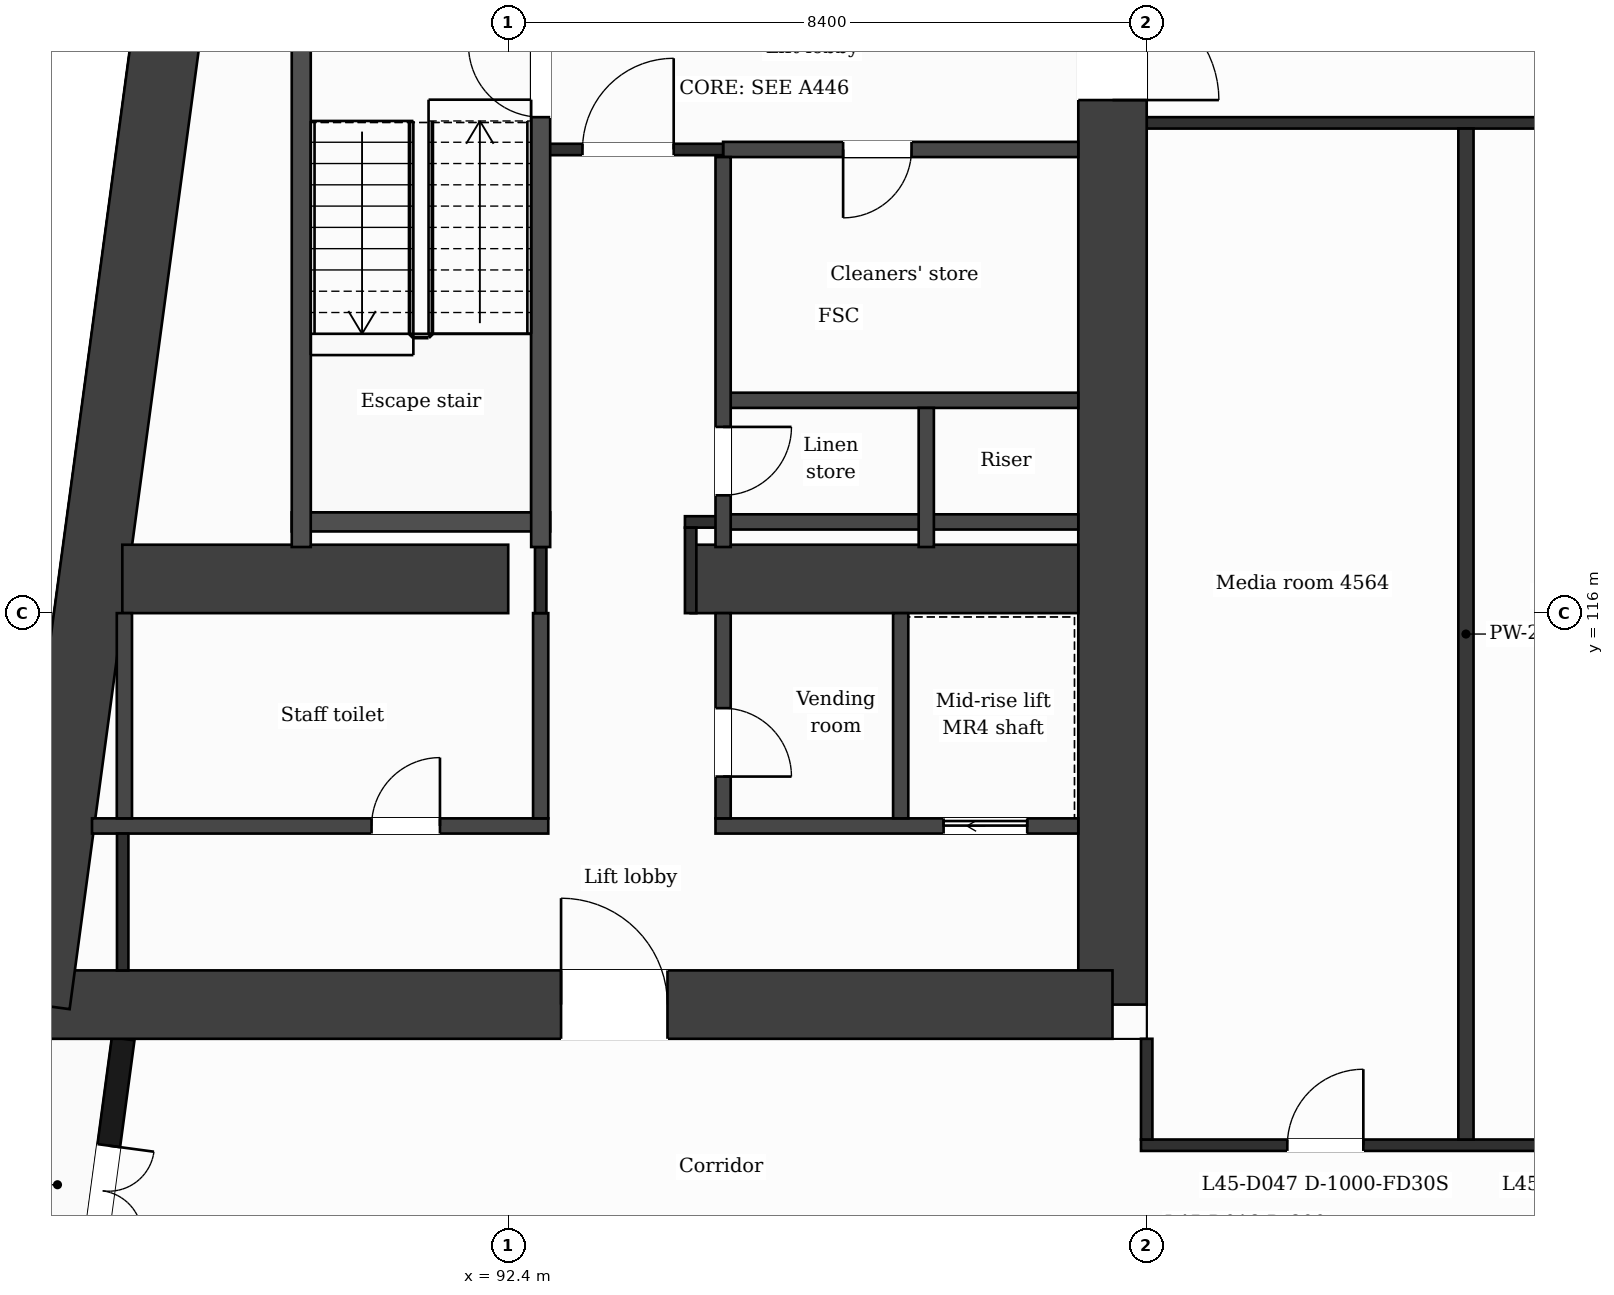
"""IFC4 building model, lengths in metres.
Left out: names, types, materials, properties, quantities, classifications, styles, units other than length and angle.
Written with IfcOpenShell. Run it as: python <this file> out.ifc"""

import sys

from ifc_helpers import new_model, si_unit, direction, frame, frame_2d, origin, place, context, subcontext, project, spatial, rectangle, extrude, element, fill, save


model = new_model("IFC4")
c1 = context("Model", 3, precision=1e-05, world=origin(), true_north=direction((0.0, 1.0)))
c2 = subcontext(c1, "Body", "Model", "MODEL_VIEW")
j1 = project(units=[si_unit("LENGTHUNIT", "METRE"), si_unit("PLANEANGLEUNIT", "RADIAN")], contexts=[c1])
p1 = place(None, origin())
s1 = spatial("IfcSite", under=j1, at=p1, CompositionType="ELEMENT")
p2 = place(p1, origin())
s2 = spatial("IfcBuilding", under=s1, at=p2, CompositionType="ELEMENT")
p3 = place(p2, frame((0.0, 0.0, 188.5)))
s3 = spatial("IfcBuildingStorey", under=s2, at=p3, CompositionType="ELEMENT", Elevation=188.5)
p4 = place(p3, frame((100.35, 131.95, 0.0), z_axis=(0.0, 0.0, 1.0), x_axis=(0.0, -1.0, 0.0)))
e1 = element("IfcWall", 1, at=p4, inside=s3, PredefinedType="SHEAR", context=c2, shape_type="SweptSolid", body=[
    extrude(rectangle(XDim=21.1, YDim=0.9, at=frame_2d((10.55, 0.0))), origin(), (0.0, 0.0, 1.0), 3.7),
])
p5 = place(p4, frame((7.8, 0.0, 0.0)))
e2 = element("IfcOpeningElement", 2, at=p5, cuts=e1, PredefinedType="OPENING", context=c2, shape_type="SweptSolid", body=[
    extrude(rectangle(XDim=1.4, YDim=2.1, at=frame_2d((0.7, 1.05))), frame((0.0, 0.46, 0.0), z_axis=(0.0, -1.0, 0.0), x_axis=(1.0, 0.0, 0.0)), (0.0, 0.0, 1.0), 0.92),
])
p6 = place(p3, frame((100.35, 110.85, 0.0), z_axis=(0.0, 0.0, 1.0), x_axis=(-1.0, 0.0, 0.0)))
e3 = element("IfcWall", 3, at=p6, inside=s3, PredefinedType="SHEAR", context=c2, shape_type="SweptSolid", body=[
    extrude(rectangle(XDim=14.166, YDim=0.9, at=frame_2d((7.083, 0.0))), origin(), (0.0, 0.0, 1.0), 3.7),
])
p7 = place(p6, frame((5.855, 0.0, 0.0)))
e4 = element("IfcOpeningElement", 4, at=p7, cuts=e3, PredefinedType="OPENING", context=c2, shape_type="SweptSolid", body=[
    extrude(rectangle(XDim=1.4, YDim=2.1, at=frame_2d((0.7, 1.05))), frame((0.0, 0.46, 0.0), z_axis=(0.0, -1.0, 0.0), x_axis=(1.0, 0.0, 0.0)), (0.0, 0.0, 1.0), 0.92),
])
p8 = place(p3, frame((86.184, 110.85, 0.0), z_axis=(0.0, 0.0, 1.0), x_axis=(0.133410495943, 0.991060865725, 0.0)))
e5 = element("IfcWall", 5, at=p8, inside=s3, PredefinedType="SHEAR", context=c2, shape_type="SweptSolid", body=[
    extrude(rectangle(XDim=21.29, YDim=0.9, at=frame_2d((10.645, 0.0))), origin(), (0.0, 0.0, 1.0), 3.7),
])
p9 = place(p3, frame((87.323, 116.45, 0.0), z_axis=(0.0, 0.0, 1.0), x_axis=(1.0, 0.0, 0.0)))
e6 = element("IfcWall", 6, at=p9, inside=s3, PredefinedType="SHEAR", context=c2, shape_type="SweptSolid", body=[
    extrude(rectangle(XDim=5.077, YDim=0.9, at=frame_2d((2.539, 0.0))), origin(), (0.0, 0.0, 1.0), 3.7),
])
p10 = place(p3, frame((94.8, 116.45, 0.0), z_axis=(0.0, 0.0, 1.0), x_axis=(1.0, 0.0, 0.0)))
e7 = element("IfcWall", 7, at=p10, inside=s3, PredefinedType="SHEAR", context=c2, shape_type="SweptSolid", body=[
    extrude(rectangle(XDim=5.1, YDim=0.9, at=frame_2d((2.55, 0.0))), origin(), (0.0, 0.0, 1.0), 3.7),
])
p11 = place(p3, frame((87.334, 110.4, 0.0), z_axis=(0.0, 0.0, 1.0), x_axis=(-0.133437175554, -0.991057273915, 0.0)))
e8 = element("IfcWall", 8, at=p11, inside=s3, PredefinedType="SOLIDWALL", context=c2, shape_type="SweptSolid", body=[
    extrude(rectangle(XDim=6.781, YDim=0.3, at=frame_2d((3.39, 0.0))), origin(), (0.0, 0.0, 1.0), 3.25),
])
p12 = place(p11, frame((1.418, 0.0, 0.0)))
e9 = element("IfcOpeningElement", 9, at=p12, cuts=e8, PredefinedType="OPENING", context=c2, shape_type="SweptSolid", body=[
    extrude(rectangle(XDim=1.2, YDim=2.4, at=frame_2d((0.6, 1.2))), frame((0.0, 0.16, 0.0), z_axis=(0.0, -1.0, 0.0), x_axis=(1.0, 0.0, 0.0)), (0.0, 0.0, 1.0), 0.32),
])
p13 = place(p11, frame((4.758, 0.0, 0.9)))
e10 = element("IfcOpeningElement", 10, at=p13, cuts=e8, PredefinedType="OPENING", context=c2, shape_type="SweptSolid", body=[
    extrude(rectangle(XDim=1.2, YDim=2.1, at=frame_2d((0.6, 1.05))), frame((0.0, 0.16, 0.0), z_axis=(0.0, -1.0, 0.0), x_axis=(1.0, 0.0, 0.0)), (0.0, 0.0, 1.0), 0.32),
])
p14 = place(p3, frame((100.725, 109.0, 0.0), z_axis=(0.0, 0.0, 1.0), x_axis=(1.0, 0.0, 0.0)))
e11 = element("IfcWall", 11, at=p14, inside=s3, PredefinedType="PARTITIONING", context=c2, shape_type="SweptSolid", body=[
    extrude(rectangle(XDim=25.35, YDim=0.15, at=frame_2d((12.675, 0.0))), origin(), (0.0, 0.0, 1.0), 3.25),
])
p15 = place(p14, frame((1.925, 0.0, 0.0)))
e12 = element("IfcOpeningElement", 12, at=p15, cuts=e11, PredefinedType="OPENING", context=c2, shape_type="SweptSolid", body=[
    extrude(rectangle(XDim=1.0, YDim=2.1, at=frame_2d((0.5, 1.05))), frame((0.0, 0.085, 0.0), z_axis=(0.0, -1.0, 0.0), x_axis=(1.0, 0.0, 0.0)), (0.0, 0.0, 1.0), 0.17),
])
p16 = place(p14, frame((5.875, 0.0, 0.0)))
e13 = element("IfcOpeningElement", 13, at=p16, cuts=e11, PredefinedType="OPENING", context=c2, shape_type="SweptSolid", body=[
    extrude(rectangle(XDim=1.0, YDim=2.1, at=frame_2d((0.5, 1.05))), frame((0.0, 0.085, 0.0), z_axis=(0.0, -1.0, 0.0), x_axis=(1.0, 0.0, 0.0)), (0.0, 0.0, 1.0), 0.17),
])
p17 = place(p14, frame((12.845, 0.0, 0.0)))
e14 = element("IfcOpeningElement", 14, at=p17, cuts=e11, PredefinedType="OPENING", context=c2, shape_type="SweptSolid", body=[
    extrude(rectangle(XDim=1.0, YDim=2.1, at=frame_2d((0.5, 1.05))), frame((0.0, 0.085, 0.0), z_axis=(0.0, -1.0, 0.0), x_axis=(1.0, 0.0, 0.0)), (0.0, 0.0, 1.0), 0.17),
])
p18 = place(p14, frame((22.25, 0.0, 0.0)))
e15 = element("IfcOpeningElement", 15, at=p18, cuts=e11, PredefinedType="OPENING", context=c2, shape_type="SweptSolid", body=[
    extrude(rectangle(XDim=1.0, YDim=2.1, at=frame_2d((0.5, 1.05))), frame((0.0, 0.085, 0.0), z_axis=(0.0, -1.0, 0.0), x_axis=(1.0, 0.0, 0.0)), (0.0, 0.0, 1.0), 0.17),
])
p19 = place(p3, frame((86.924, 113.2, 0.0), z_axis=(0.0, 0.0, 1.0), x_axis=(1.0, 0.0, 0.0)))
e16 = element("IfcWall", 16, at=p19, inside=s3, PredefinedType="PARTITIONING", context=c2, shape_type="SweptSolid", body=[
    extrude(rectangle(XDim=6.003, YDim=0.2, at=frame_2d((3.001, 0.0))), origin(), (0.0, 0.0, 1.0), 3.25),
])
p20 = place(p19, frame((3.678, 0.0, 0.0)))
e17 = element("IfcOpeningElement", 17, at=p20, cuts=e16, PredefinedType="OPENING", context=c2, shape_type="SweptSolid", body=[
    extrude(rectangle(XDim=0.9, YDim=2.1, at=frame_2d((0.45, 1.05))), frame((0.0, 0.11, 0.0), z_axis=(0.0, -1.0, 0.0), x_axis=(1.0, 0.0, 0.0)), (0.0, 0.0, 1.0), 0.22),
])
p21 = place(p3, frame((95.127, 113.2, 0.0), z_axis=(0.0, 0.0, 1.0), x_axis=(1.0, 0.0, 0.0)))
e18 = element("IfcWall", 18, at=p21, inside=s3, PredefinedType="PARTITIONING", context=c2, shape_type="SweptSolid", body=[
    extrude(rectangle(XDim=4.773, YDim=0.2, at=frame_2d((2.386, 0.0))), origin(), (0.0, 0.0, 1.0), 3.25),
])
p22 = place(p21, frame((3.001, 0.0, 0.0)))
e19 = element("IfcOpeningElement", 19, at=p22, cuts=e18, PredefinedType="OPENING", context=c2, shape_type="SweptSolid", body=[
    extrude(rectangle(XDim=1.1, YDim=2.1, at=frame_2d((0.55, 1.05))), frame((0.0, 0.11, 0.0), z_axis=(0.0, -1.0, 0.0), x_axis=(1.0, 0.0, 0.0)), (0.0, 0.0, 1.0), 0.22),
])
p23 = place(p3, frame((95.227, 117.2, 0.0), z_axis=(0.0, 0.0, 1.0), x_axis=(1.0, 0.0, 0.0)))
e20 = element("IfcWall", 20, at=p23, inside=s3, PredefinedType="PARTITIONING", context=c2, shape_type="SweptSolid", body=[
    extrude(rectangle(XDim=4.673, YDim=0.2, at=frame_2d((2.336, 0.0))), origin(), (0.0, 0.0, 1.0), 3.25),
])
p24 = place(p3, frame((94.725, 117.2, 0.0), z_axis=(0.0, 0.0, 1.0), x_axis=(1.0, 0.0, 0.0)))
e21 = element("IfcWall", 21, at=p24, inside=s3, PredefinedType="PARTITIONING", context=c2, shape_type="SweptSolid", body=[
    extrude(rectangle(XDim=0.502, YDim=0.15, at=frame_2d((0.251, 0.0))), origin(), (0.0, 0.0, 1.0), 3.25),
])
p25 = place(p3, frame((89.552, 117.2, 0.0), z_axis=(0.0, 0.0, 1.0), x_axis=(1.0, 0.0, 0.0)))
e22 = element("IfcWall", 22, at=p25, inside=s3, PredefinedType="PARTITIONING", context=c2, shape_type="SweptSolid", body=[
    extrude(rectangle(XDim=3.4, YDim=0.25, at=frame_2d((1.7, 0.0))), origin(), (0.0, 0.0, 1.0), 3.25),
])
p26 = place(p3, frame((95.227, 118.8, 0.0), z_axis=(0.0, 0.0, 1.0), x_axis=(1.0, 0.0, 0.0)))
e23 = element("IfcWall", 23, at=p26, inside=s3, PredefinedType="PARTITIONING", context=c2, shape_type="SweptSolid", body=[
    extrude(rectangle(XDim=4.673, YDim=0.2, at=frame_2d((2.336, 0.0))), origin(), (0.0, 0.0, 1.0), 3.25),
])
p27 = place(p3, frame((95.227, 122.1, 0.0), z_axis=(0.0, 0.0, 1.0), x_axis=(1.0, 0.0, 0.0)))
e24 = element("IfcWall", 24, at=p27, inside=s3, PredefinedType="PARTITIONING", context=c2, shape_type="SweptSolid", body=[
    extrude(rectangle(XDim=4.673, YDim=0.2, at=frame_2d((2.336, 0.0))), origin(), (0.0, 0.0, 1.0), 3.25),
])
p28 = place(p27, frame((1.579, 0.0, 0.0)))
e25 = element("IfcOpeningElement", 25, at=p28, cuts=e24, PredefinedType="OPENING", context=c2, shape_type="SweptSolid", body=[
    extrude(rectangle(XDim=0.9, YDim=2.1, at=frame_2d((0.45, 1.05))), frame((0.0, 0.11, 0.0), z_axis=(0.0, -1.0, 0.0), x_axis=(1.0, 0.0, 0.0)), (0.0, 0.0, 1.0), 0.22),
])
p29 = place(p3, frame((92.827, 122.1, 0.0), z_axis=(0.0, 0.0, 1.0), x_axis=(1.0, 0.0, 0.0)))
e26 = element("IfcWall", 26, at=p29, inside=s3, PredefinedType="PARTITIONING", context=c2, shape_type="SweptSolid", body=[
    extrude(rectangle(XDim=2.4, YDim=0.15, at=frame_2d((1.2, 0.0))), origin(), (0.0, 0.0, 1.0), 3.25),
])
p30 = place(p29, frame((0.55, 0.0, 0.0)))
e27 = element("IfcOpeningElement", 27, at=p30, cuts=e26, PredefinedType="OPENING", context=c2, shape_type="SweptSolid", body=[
    extrude(rectangle(XDim=1.2, YDim=2.1, at=frame_2d((0.6, 1.05))), frame((0.0, 0.085, 0.0), z_axis=(0.0, -1.0, 0.0), x_axis=(1.0, 0.0, 0.0)), (0.0, 0.0, 1.0), 0.17),
])
p31 = place(p3, frame((100.8, 122.45, 0.0), z_axis=(0.0, 0.0, 1.0), x_axis=(1.0, 0.0, 0.0)))
e28 = element("IfcWall", 28, at=p31, inside=s3, PredefinedType="PARTITIONING", context=c2, shape_type="SweptSolid", body=[
    extrude(rectangle(XDim=25.2, YDim=0.15, at=frame_2d((12.6, 0.0))), origin(), (0.0, 0.0, 1.0), 3.25),
])
p32 = place(p3, frame((87.35, 113.3, 0.0), z_axis=(0.0, 0.0, 1.0), x_axis=(0.0, 1.0, 0.0)))
e29 = element("IfcWall", 29, at=p32, inside=s3, PredefinedType="PARTITIONING", context=c2, shape_type="SweptSolid", body=[
    extrude(rectangle(XDim=2.7, YDim=0.2, at=frame_2d((1.35, 0.0))), origin(), (0.0, 0.0, 1.0), 3.25),
])
p33 = place(p3, frame((87.328, 111.3, 0.0), z_axis=(0.0, 0.0, 1.0), x_axis=(0.0, 1.0, 0.0)))
e30 = element("IfcWall", 30, at=p33, inside=s3, PredefinedType="PARTITIONING", context=c2, shape_type="SweptSolid", body=[
    extrude(rectangle(XDim=1.8, YDim=0.15, at=frame_2d((0.9, 0.0))), origin(), (0.0, 0.0, 1.0), 3.25),
])
p34 = place(p3, frame((89.677, 116.87, 0.0), z_axis=(0.0, 0.0, 1.0), x_axis=(0.0, 1.0, 0.0)))
e31 = element("IfcWall", 31, at=p34, inside=s3, PredefinedType="PARTITIONING", context=c2, shape_type="SweptSolid", body=[
    extrude(rectangle(XDim=6.955, YDim=0.25, at=frame_2d((3.478, 0.0))), origin(), (0.0, 0.0, 1.0), 3.25),
])
p35 = place(p3, frame((92.827, 113.3, 0.0), z_axis=(0.0, 0.0, 1.0), x_axis=(0.0, 1.0, 0.0)))
e32 = element("IfcWall", 32, at=p35, inside=s3, PredefinedType="PARTITIONING", context=c2, shape_type="SweptSolid", body=[
    extrude(rectangle(XDim=2.7, YDim=0.2, at=frame_2d((1.35, 0.0))), origin(), (0.0, 0.0, 1.0), 3.25),
])
p36 = place(p3, frame((92.827, 116.0, 0.0), z_axis=(0.0, 0.0, 1.0), x_axis=(0.0, 1.0, 0.0)))
e33 = element("IfcWall", 33, at=p36, inside=s3, PredefinedType="PARTITIONING", context=c2, shape_type="SweptSolid", body=[
    extrude(rectangle(XDim=0.87, YDim=0.15, at=frame_2d((0.435, 0.0))), origin(), (0.0, 0.0, 1.0), 3.25),
])
p37 = place(p3, frame((92.827, 116.87, 0.0), z_axis=(0.0, 0.0, 1.0), x_axis=(0.0, 1.0, 0.0)))
e34 = element("IfcWall", 34, at=p37, inside=s3, PredefinedType="PARTITIONING", context=c2, shape_type="SweptSolid", body=[
    extrude(rectangle(XDim=6.955, YDim=0.25, at=frame_2d((3.478, 0.0))), origin(), (0.0, 0.0, 1.0), 3.25),
])
p38 = place(p37, frame((5.655, 0.0, 0.0)))
e35 = element("IfcOpeningElement", 35, at=p38, cuts=e34, PredefinedType="OPENING", context=c2, shape_type="SweptSolid", body=[
    extrude(rectangle(XDim=0.95, YDim=2.1, at=frame_2d((0.475, 1.05))), frame((0.0, 0.135, 0.0), z_axis=(0.0, -1.0, 0.0), x_axis=(1.0, 0.0, 0.0)), (0.0, 0.0, 1.0), 0.27),
])
p39 = place(p3, frame((94.8, 116.0, 0.0), z_axis=(0.0, 0.0, 1.0), x_axis=(0.0, 1.0, 0.0)))
e36 = element("IfcWall", 36, at=p39, inside=s3, PredefinedType="PARTITIONING", context=c2, shape_type="SweptSolid", body=[
    extrude(rectangle(XDim=1.125, YDim=0.15, at=frame_2d((0.562, 0.0))), origin(), (0.0, 0.0, 1.0), 3.25),
])
p40 = place(p3, frame((95.227, 113.3, 0.0), z_axis=(0.0, 0.0, 1.0), x_axis=(0.0, 1.0, 0.0)))
e37 = element("IfcWall", 37, at=p40, inside=s3, PredefinedType="PARTITIONING", context=c2, shape_type="SweptSolid", body=[
    extrude(rectangle(XDim=2.7, YDim=0.2, at=frame_2d((1.35, 0.0))), origin(), (0.0, 0.0, 1.0), 3.25),
])
p41 = place(p40, frame((0.55, 0.0, 0.0)))
e38 = element("IfcOpeningElement", 38, at=p41, cuts=e37, PredefinedType="OPENING", context=c2, shape_type="SweptSolid", body=[
    extrude(rectangle(XDim=0.9, YDim=2.1, at=frame_2d((0.45, 1.05))), frame((0.0, 0.11, 0.0), z_axis=(0.0, -1.0, 0.0), x_axis=(1.0, 0.0, 0.0)), (0.0, 0.0, 1.0), 0.22),
])
p42 = place(p3, frame((95.227, 116.87, 0.0), z_axis=(0.0, 0.0, 1.0), x_axis=(0.0, 1.0, 0.0)))
e39 = element("IfcWall", 39, at=p42, inside=s3, PredefinedType="PARTITIONING", context=c2, shape_type="SweptSolid", body=[
    extrude(rectangle(XDim=5.13, YDim=0.2, at=frame_2d((2.565, 0.0))), origin(), (0.0, 0.0, 1.0), 3.25),
])
p43 = place(p42, frame((0.68, 0.0, 0.0)))
e40 = element("IfcOpeningElement", 40, at=p43, cuts=e39, PredefinedType="OPENING", context=c2, shape_type="SweptSolid", body=[
    extrude(rectangle(XDim=0.9, YDim=2.1, at=frame_2d((0.45, 1.05))), frame((0.0, 0.11, 0.0), z_axis=(0.0, -1.0, 0.0), x_axis=(1.0, 0.0, 0.0)), (0.0, 0.0, 1.0), 0.22),
])
p44 = place(p3, frame((97.563, 113.3, 0.0), z_axis=(0.0, 0.0, 1.0), x_axis=(0.0, 1.0, 0.0)))
e41 = element("IfcWall", 41, at=p44, inside=s3, PredefinedType="PARTITIONING", context=c2, shape_type="SweptSolid", body=[
    extrude(rectangle(XDim=2.7, YDim=0.2, at=frame_2d((1.35, 0.0))), origin(), (0.0, 0.0, 1.0), 3.25),
])
p45 = place(p3, frame((97.9, 116.87, 0.0), z_axis=(0.0, 0.0, 1.0), x_axis=(0.0, 1.0, 0.0)))
e42 = element("IfcWall", 42, at=p45, inside=s3, PredefinedType="PARTITIONING", context=c2, shape_type="SweptSolid", body=[
    extrude(rectangle(XDim=1.83, YDim=0.2, at=frame_2d((0.915, 0.0))), origin(), (0.0, 0.0, 1.0), 3.25),
])
p46 = place(p3, frame((100.8, 109.075, 0.0), z_axis=(0.0, 0.0, 1.0), x_axis=(0.0, 1.0, 0.0)))
e43 = element("IfcWall", 43, at=p46, inside=s3, PredefinedType="PARTITIONING", context=c2, shape_type="SweptSolid", body=[
    extrude(rectangle(XDim=1.325, YDim=0.15, at=frame_2d((0.663, 0.0))), origin(), (0.0, 0.0, 1.0), 3.25),
])
p47 = place(p3, frame((105.0, 109.075, 0.0), z_axis=(0.0, 0.0, 1.0), x_axis=(0.0, 1.0, 0.0)))
e44 = element("IfcWall", 44, at=p47, inside=s3, PredefinedType="PARTITIONING", context=c2, shape_type="SweptSolid", body=[
    extrude(rectangle(XDim=13.3, YDim=0.2, at=frame_2d((6.65, 0.0))), origin(), (0.0, 0.0, 1.0), 3.25),
])
p48 = place(p12, origin())
e45 = element("IfcDoor", 45, at=p48, inside=s3, OperationType="DOUBLE_DOOR_SINGLE_SWING", PredefinedType="DOOR", context=c2, shape_type="SweptSolid", body=[
    extrude(rectangle(XDim=1.2, YDim=2.4, at=frame_2d((0.6, 1.2))), frame((0.0, 0.025, 0.0), z_axis=(0.0, -1.0, 0.0), x_axis=(1.0, 0.0, 0.0)), (0.0, 0.0, 1.0), 0.05),
])
fill(e9, e45)
p49 = place(p30, origin())
e46 = element("IfcDoor", 46, at=p49, inside=s3, OperationType="SINGLE_SWING_RIGHT", PredefinedType="DOOR", context=c2, shape_type="SweptSolid", body=[
    extrude(rectangle(XDim=1.2, YDim=2.1, at=frame_2d((0.6, 1.05))), frame((0.0, 0.025, 0.0), z_axis=(0.0, -1.0, 0.0), x_axis=(1.0, 0.0, 0.0)), (0.0, 0.0, 1.0), 0.05),
])
fill(e27, e46)
p50 = place(p28, origin())
e47 = element("IfcDoor", 47, at=p50, inside=s3, OperationType="SINGLE_SWING_LEFT", PredefinedType="DOOR", context=c2, shape_type="SweptSolid", body=[
    extrude(rectangle(XDim=0.9, YDim=2.1, at=frame_2d((0.45, 1.05))), frame((0.0, 0.025, 0.0), z_axis=(0.0, -1.0, 0.0), x_axis=(1.0, 0.0, 0.0)), (0.0, 0.0, 1.0), 0.05),
])
fill(e25, e47)
p51 = place(p38, origin())
e48 = element("IfcDoor", 48, at=p51, inside=s3, OperationType="SINGLE_SWING_RIGHT", PredefinedType="DOOR", context=c2, shape_type="SweptSolid", body=[
    extrude(rectangle(XDim=0.95, YDim=2.1, at=frame_2d((0.475, 1.05))), frame((0.0, 0.025, 0.0), z_axis=(0.0, -1.0, 0.0), x_axis=(1.0, 0.0, 0.0)), (0.0, 0.0, 1.0), 0.05),
])
fill(e35, e48)
p52 = place(p43, origin())
e49 = element("IfcDoor", 49, at=p52, inside=s3, OperationType="SINGLE_SWING_RIGHT", PredefinedType="DOOR", context=c2, shape_type="SweptSolid", body=[
    extrude(rectangle(XDim=0.9, YDim=2.1, at=frame_2d((0.45, 1.05))), frame((0.0, 0.025, 0.0), z_axis=(0.0, -1.0, 0.0), x_axis=(1.0, 0.0, 0.0)), (0.0, 0.0, 1.0), 0.05),
])
fill(e40, e49)
p53 = place(p22, origin())
e50 = element("IfcDoor", 50, at=p53, inside=s3, OperationType="SLIDING_TO_LEFT", PredefinedType="DOOR", context=c2, shape_type="SweptSolid", body=[
    extrude(rectangle(XDim=1.1, YDim=2.1, at=frame_2d((0.55, 1.05))), frame((0.0, 0.025, 0.0), z_axis=(0.0, -1.0, 0.0), x_axis=(1.0, 0.0, 0.0)), (0.0, 0.0, 1.0), 0.05),
])
fill(e19, e50)
p54 = place(p20, origin())
e51 = element("IfcDoor", 51, at=p54, inside=s3, OperationType="SINGLE_SWING_RIGHT", PredefinedType="DOOR", context=c2, shape_type="SweptSolid", body=[
    extrude(rectangle(XDim=0.9, YDim=2.1, at=frame_2d((0.45, 1.05))), frame((0.0, 0.025, 0.0), z_axis=(0.0, -1.0, 0.0), x_axis=(1.0, 0.0, 0.0)), (0.0, 0.0, 1.0), 0.05),
])
fill(e17, e51)
p55 = place(p41, origin())
e52 = element("IfcDoor", 52, at=p55, inside=s3, OperationType="SINGLE_SWING_LEFT", PredefinedType="DOOR", context=c2, shape_type="SweptSolid", body=[
    extrude(rectangle(XDim=0.9, YDim=2.1, at=frame_2d((0.45, 1.05))), frame((0.0, 0.025, 0.0), z_axis=(0.0, -1.0, 0.0), x_axis=(1.0, 0.0, 0.0)), (0.0, 0.0, 1.0), 0.05),
])
fill(e38, e52)
p56 = place(p15, origin())
e53 = element("IfcDoor", 53, at=p56, inside=s3, OperationType="SINGLE_SWING_RIGHT", PredefinedType="DOOR", context=c2, shape_type="SweptSolid", body=[
    extrude(rectangle(XDim=1.0, YDim=2.1, at=frame_2d((0.5, 1.05))), frame((0.0, 0.025, 0.0), z_axis=(0.0, -1.0, 0.0), x_axis=(1.0, 0.0, 0.0)), (0.0, 0.0, 1.0), 0.05),
])
fill(e12, e53)
p57 = place(p7, origin())
e54 = element("IfcDoor", 54, at=p57, inside=s3, OperationType="SINGLE_SWING_RIGHT", PredefinedType="DOOR", context=c2, shape_type="SweptSolid", body=[
    extrude(rectangle(XDim=1.4, YDim=2.1, at=frame_2d((0.7, 1.05))), frame((0.0, 0.025, 0.0), z_axis=(0.0, -1.0, 0.0), x_axis=(1.0, 0.0, 0.0)), (0.0, 0.0, 1.0), 0.05),
])
fill(e4, e54)
p58 = place(p5, origin())
e55 = element("IfcDoor", 55, at=p58, inside=s3, OperationType="SINGLE_SWING_RIGHT", PredefinedType="DOOR", context=c2, shape_type="SweptSolid", body=[
    extrude(rectangle(XDim=1.4, YDim=2.1, at=frame_2d((0.7, 1.05))), frame((0.0, 0.025, 0.0), z_axis=(0.0, -1.0, 0.0), x_axis=(1.0, 0.0, 0.0)), (0.0, 0.0, 1.0), 0.05),
])
fill(e2, e55)
save(model, sys.argv[1])
